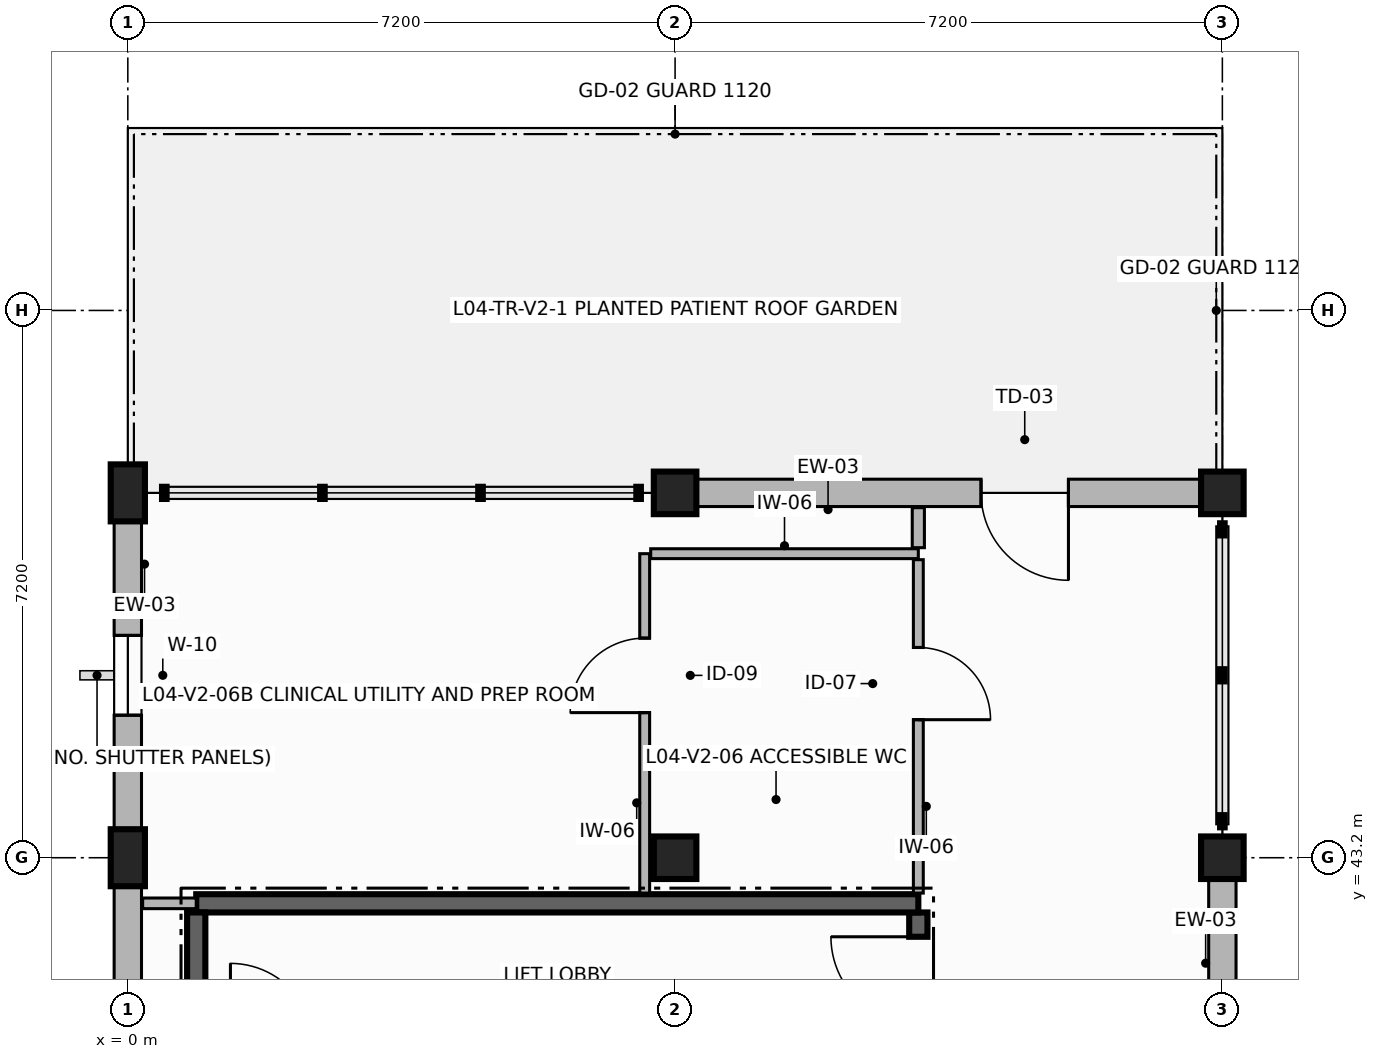
"""IFC4 building model, lengths in metres.
Left out: names, types, materials, properties, quantities, classifications, styles, units other than length and angle.
Written with IfcOpenShell. Run it as: python <this file> out.ifc"""

import sys

from ifc_helpers import new_model, si_unit, direction, frame, frame_2d, origin, origin_2d, place, context, subcontext, project, spatial, rectangle, extrude, element, fill, save


model = new_model("IFC4")
c1 = context("Model", 3, precision=1e-05, world=origin(), true_north=direction((0.0, 1.0)))
c2 = subcontext(c1, "Body", "Model", "MODEL_VIEW")
j1 = project(units=[si_unit("LENGTHUNIT", "METRE"), si_unit("PLANEANGLEUNIT", "RADIAN")], contexts=[c1])
p1 = place(None, origin())
s1 = spatial("IfcSite", under=j1, at=p1, CompositionType="ELEMENT")
p2 = place(p1, origin())
s2 = spatial("IfcBuilding", under=s1, at=p2, CompositionType="ELEMENT")
p3 = place(p2, frame((0.0, 0.0, 16.0)))
s3 = spatial("IfcBuildingStorey", under=s2, at=p3, CompositionType="ELEMENT", Elevation=16.0)
for number, where, z_axis, x_axis in (
    (1, (0.0, 43.2, 0.0), (0.0, 0.0, 1.0), (1.0, 0.0, 0.0)),
    (2, (0.0, 48.0, 0.0), (0.0, 0.0, 1.0), (1.0, 0.0, 0.0)),
):
    element("IfcColumn", number, at=place(p3, frame(where, z_axis=z_axis, x_axis=x_axis)), inside=s3, PredefinedType="PILASTER", context=c2, shape_type="SweptSolid", body=[
        extrude(rectangle(XDim=0.45, YDim=0.75, at=origin_2d()), origin(), (0.0, 0.0, 1.0), 3.42),
    ])
for number, where, z_axis, x_axis in (
    (3, (7.2, 43.2, 0.0), (0.0, 0.0, 1.0), (1.0, 0.0, 0.0)),
    (4, (7.2, 48.0, 0.0), (0.0, 0.0, 1.0), (1.0, 0.0, 0.0)),
    (5, (14.4, 43.2, 0.0), (0.0, 0.0, 1.0), (1.0, 0.0, 0.0)),
    (6, (14.4, 48.0, 0.0), (0.0, 0.0, 1.0), (1.0, 0.0, 0.0)),
):
    element("IfcColumn", number, at=place(p3, frame(where, z_axis=z_axis, x_axis=x_axis)), inside=s3, PredefinedType="COLUMN", context=c2, shape_type="SweptSolid", body=[
        extrude(rectangle(XDim=0.56, YDim=0.56, at=origin_2d()), origin(), (0.0, 0.0, 1.0), 3.42),
    ])
p4 = place(p3, frame((14.4, 36.0, 0.0), z_axis=(0.0, 0.0, 1.0), x_axis=(0.0, 1.0, 0.0)))
e7 = element("IfcWall", 7, at=p4, inside=s3, PredefinedType="SOLIDWALL", context=c2, shape_type="SweptSolid", body=[
    extrude(rectangle(XDim=7.2, YDim=0.36, at=frame_2d((3.6, 0.0))), origin(), (0.0, 0.0, 1.0), 2.8),
])
p5 = place(p4, frame((2.775, 0.0, 0.85)))
e8 = element("IfcOpeningElement", 8, at=p5, cuts=e7, PredefinedType="OPENING", context=c2, shape_type="SweptSolid", body=[
    extrude(rectangle(XDim=1.65, YDim=1.75, at=frame_2d((0.825, 0.875))), frame((0.0, 0.19, 0.0), z_axis=(0.0, -1.0, 0.0), x_axis=(1.0, 0.0, 0.0)), (0.0, 0.0, 1.0), 0.38),
])
p6 = place(p3, frame((14.4, 48.0, 0.0), z_axis=(0.0, 0.0, 1.0), x_axis=(-1.0, 0.0, 0.0)))
e9 = element("IfcWall", 9, at=p6, inside=s3, PredefinedType="SOLIDWALL", context=c2, shape_type="SweptSolid", body=[
    extrude(rectangle(XDim=7.2, YDim=0.36, at=frame_2d((3.6, 0.0))), origin(), (0.0, 0.0, 1.0), 2.8),
])
p7 = place(p6, frame((2.025, 0.0, 0.0)))
e10 = element("IfcOpeningElement", 10, at=p7, cuts=e9, PredefinedType="OPENING", context=c2, shape_type="SweptSolid", body=[
    extrude(rectangle(XDim=1.15, YDim=2.2, at=frame_2d((0.575, 1.1))), frame((0.0, 0.19, 0.0), z_axis=(0.0, -1.0, 0.0), x_axis=(1.0, 0.0, 0.0)), (0.0, 0.0, 1.0), 0.38),
])
p8 = place(p3, frame((0.0, 48.0, 0.0), z_axis=(0.0, 0.0, 1.0), x_axis=(0.0, -1.0, 0.0)))
e11 = element("IfcWall", 11, at=p8, inside=s3, PredefinedType="SOLIDWALL", context=c2, shape_type="SweptSolid", body=[
    extrude(rectangle(XDim=4.8, YDim=0.36, at=frame_2d((2.4, 0.0))), origin(), (0.0, 0.0, 1.0), 2.8),
])
p9 = place(p8, frame((1.875, 0.0, 0.85)))
e12 = element("IfcOpeningElement", 12, at=p9, cuts=e11, PredefinedType="OPENING", context=c2, shape_type="SweptSolid", body=[
    extrude(rectangle(XDim=1.05, YDim=1.7, at=frame_2d((0.525, 0.85))), frame((0.0, 0.19, 0.0), z_axis=(0.0, -1.0, 0.0), x_axis=(1.0, 0.0, 0.0)), (0.0, 0.0, 1.0), 0.38),
])
p10 = place(p3, frame((0.0, 43.2, 0.0), z_axis=(0.0, 0.0, 1.0), x_axis=(0.0, -1.0, 0.0)))
e13 = element("IfcWall", 13, at=p10, inside=s3, PredefinedType="SOLIDWALL", context=c2, shape_type="SweptSolid", body=[
    extrude(rectangle(XDim=7.2, YDim=0.36, at=frame_2d((3.6, 0.0))), origin(), (0.0, 0.0, 1.0), 2.8),
])
p11 = place(p10, frame((2.775, 0.0, 0.85)))
e14 = element("IfcOpeningElement", 14, at=p11, cuts=e13, PredefinedType="OPENING", context=c2, shape_type="SweptSolid", body=[
    extrude(rectangle(XDim=1.45, YDim=1.75, at=frame_2d((0.725, 0.875))), frame((0.0, 0.19, 0.0), z_axis=(0.0, -1.0, 0.0), x_axis=(1.0, 0.0, 0.0)), (0.0, 0.0, 1.0), 0.38),
])
p12 = place(p3, frame((10.4, 36.92, 0.0), z_axis=(0.0, 0.0, 1.0), x_axis=(0.0, 1.0, 0.0)))
e15 = element("IfcWall", 15, at=p12, inside=s3, PredefinedType="SHEAR", context=c2, shape_type="SweptSolid", body=[
    extrude(rectangle(XDim=5.56, YDim=0.24, at=frame_2d((2.78, 0.0))), origin(), (0.0, 0.0, 1.0), 3.42),
])
p13 = place(p12, frame((4.09, 0.0, 0.0)))
e16 = element("IfcOpeningElement", 16, at=p13, cuts=e15, PredefinedType="OPENING", context=c2, shape_type="SweptSolid", body=[
    extrude(rectangle(XDim=1.15, YDim=2.2, at=frame_2d((0.575, 1.1))), frame((0.0, 0.13, 0.0), z_axis=(0.0, -1.0, 0.0), x_axis=(1.0, 0.0, 0.0)), (0.0, 0.0, 1.0), 0.26),
])
p14 = place(p3, frame((10.4, 42.6, 0.0), z_axis=(0.0, 0.0, 1.0), x_axis=(-1.0, 0.0, 0.0)))
e17 = element("IfcWall", 17, at=p14, inside=s3, PredefinedType="SHEAR", context=c2, shape_type="SweptSolid", body=[
    extrude(rectangle(XDim=9.5, YDim=0.24, at=frame_2d((4.75, 0.0))), origin(), (0.0, 0.0, 1.0), 3.42),
])
p15 = place(p3, frame((0.9, 42.48, 0.0), z_axis=(0.0, 0.0, 1.0), x_axis=(0.0, -1.0, 0.0)))
e18 = element("IfcWall", 18, at=p15, inside=s3, PredefinedType="SHEAR", context=c2, shape_type="SweptSolid", body=[
    extrude(rectangle(XDim=5.56, YDim=0.24, at=frame_2d((2.78, 0.0))), origin(), (0.0, 0.0, 1.0), 3.42),
])
p16 = place(p3, frame((6.8, 42.735, 0.0), z_axis=(0.0, 0.0, 1.0), x_axis=(0.0, 1.0, 0.0)))
e19 = element("IfcWall", 19, at=p16, inside=s3, PredefinedType="PARTITIONING", context=c2, shape_type="SweptSolid", body=[
    extrude(rectangle(XDim=4.465, YDim=0.13, at=frame_2d((2.232, 0.0))), origin(), (0.0, 0.0, 1.0), 2.78),
])
p17 = place(p16, frame((2.374, 0.0, 0.0)))
e20 = element("IfcOpeningElement", 20, at=p17, cuts=e19, PredefinedType="OPENING", context=c2, shape_type="SweptSolid", body=[
    extrude(rectangle(XDim=0.98, YDim=2.15, at=frame_2d((0.49, 1.075))), frame((0.0, 0.075, 0.0), z_axis=(0.0, -1.0, 0.0), x_axis=(1.0, 0.0, 0.0)), (0.0, 0.0, 1.0), 0.15),
])
p18 = place(p3, frame((6.879, 47.2, 0.0), z_axis=(0.0, 0.0, 1.0), x_axis=(1.0, 0.0, 0.0)))
e21 = element("IfcWall", 21, at=p18, inside=s3, PredefinedType="PARTITIONING", context=c2, shape_type="SweptSolid", body=[
    extrude(rectangle(XDim=3.521, YDim=0.13, at=frame_2d((1.76, 0.0))), origin(), (0.0, 0.0, 1.0), 2.78),
])
p19 = place(p3, frame((10.4, 47.121, 0.0), z_axis=(0.0, 0.0, 1.0), x_axis=(0.0, -1.0, 0.0)))
e22 = element("IfcWall", 22, at=p19, inside=s3, PredefinedType="PARTITIONING", context=c2, shape_type="SweptSolid", body=[
    extrude(rectangle(XDim=4.386, YDim=0.13, at=frame_2d((2.193, 0.0))), origin(), (0.0, 0.0, 1.0), 2.78),
])
p20 = place(p19, frame((1.155, 0.0, 0.0)))
e23 = element("IfcOpeningElement", 23, at=p20, cuts=e22, PredefinedType="OPENING", context=c2, shape_type="SweptSolid", body=[
    extrude(rectangle(XDim=0.95, YDim=2.1, at=frame_2d((0.475, 1.05))), frame((0.0, 0.075, 0.0), z_axis=(0.0, -1.0, 0.0), x_axis=(1.0, 0.0, 0.0)), (0.0, 0.0, 1.0), 0.15),
])
p21 = place(p3, frame((0.9, 42.6, 0.0), z_axis=(0.0, 0.0, 1.0), x_axis=(-1.0, 0.0, 0.0)))
e24 = element("IfcWall", 24, at=p21, inside=s3, PredefinedType="PARTITIONING", context=c2, shape_type="SweptSolid", body=[
    extrude(rectangle(XDim=0.705, YDim=0.14, at=frame_2d((0.353, 0.0))), origin(), (0.0, 0.0, 1.0), 2.78),
])
p22 = place(p3, frame((10.4, 47.805, 0.0), z_axis=(0.0, 0.0, 1.0), x_axis=(0.0, -1.0, 0.0)))
e25 = element("IfcWall", 25, at=p22, inside=s3, PredefinedType="PARTITIONING", context=c2, shape_type="SweptSolid", body=[
    extrude(rectangle(XDim=0.526, YDim=0.16, at=frame_2d((0.263, 0.0))), origin(), (0.0, 0.0, 1.0), 2.78),
])
p23 = place(p7, origin())
e26 = element("IfcDoor", 26, at=p23, inside=s3, OperationType="SINGLE_SWING_LEFT", PredefinedType="DOOR", context=c2, shape_type="SweptSolid", body=[
    extrude(rectangle(XDim=1.15, YDim=2.2, at=frame_2d((0.575, 1.1))), frame((0.0, 0.025, 0.0), z_axis=(0.0, -1.0, 0.0), x_axis=(1.0, 0.0, 0.0)), (0.0, 0.0, 1.0), 0.05),
])
fill(e10, e26)
p24 = place(p9, origin())
e27 = element("IfcWindow", 27, at=p24, inside=s3, PartitioningType="SINGLE_PANEL", PredefinedType="WINDOW", context=c2, shape_type="SweptSolid", body=[
    extrude(rectangle(XDim=1.05, YDim=1.7, at=frame_2d((0.525, 0.85))), frame((0.0, 0.03, 0.0), z_axis=(0.0, -1.0, 0.0), x_axis=(1.0, 0.0, 0.0)), (0.0, 0.0, 1.0), 0.06),
])
fill(e12, e27)
p25 = place(p13, origin())
e28 = element("IfcDoor", 28, at=p25, inside=s3, OperationType="SINGLE_SWING_RIGHT", PredefinedType="DOOR", context=c2, shape_type="SweptSolid", body=[
    extrude(rectangle(XDim=1.15, YDim=2.2, at=frame_2d((0.575, 1.1))), frame((0.0, 0.025, 0.0), z_axis=(0.0, -1.0, 0.0), x_axis=(1.0, 0.0, 0.0)), (0.0, 0.0, 1.0), 0.05),
])
fill(e16, e28)
p26 = place(p20, origin())
e29 = element("IfcDoor", 29, at=p26, inside=s3, OperationType="SINGLE_SWING_RIGHT", PredefinedType="DOOR", context=c2, shape_type="SweptSolid", body=[
    extrude(rectangle(XDim=0.95, YDim=2.1, at=frame_2d((0.475, 1.05))), frame((0.0, 0.025, 0.0), z_axis=(0.0, -1.0, 0.0), x_axis=(1.0, 0.0, 0.0)), (0.0, 0.0, 1.0), 0.05),
])
fill(e23, e29)
p27 = place(p17, origin())
e30 = element("IfcDoor", 30, at=p27, inside=s3, OperationType="SINGLE_SWING_LEFT", PredefinedType="DOOR", context=c2, shape_type="SweptSolid", body=[
    extrude(rectangle(XDim=0.98, YDim=2.15, at=frame_2d((0.49, 1.075))), frame((0.0, 0.025, 0.0), z_axis=(0.0, -1.0, 0.0), x_axis=(1.0, 0.0, 0.0)), (0.0, 0.0, 1.0), 0.05),
])
fill(e20, e30)
save(model, sys.argv[1])
